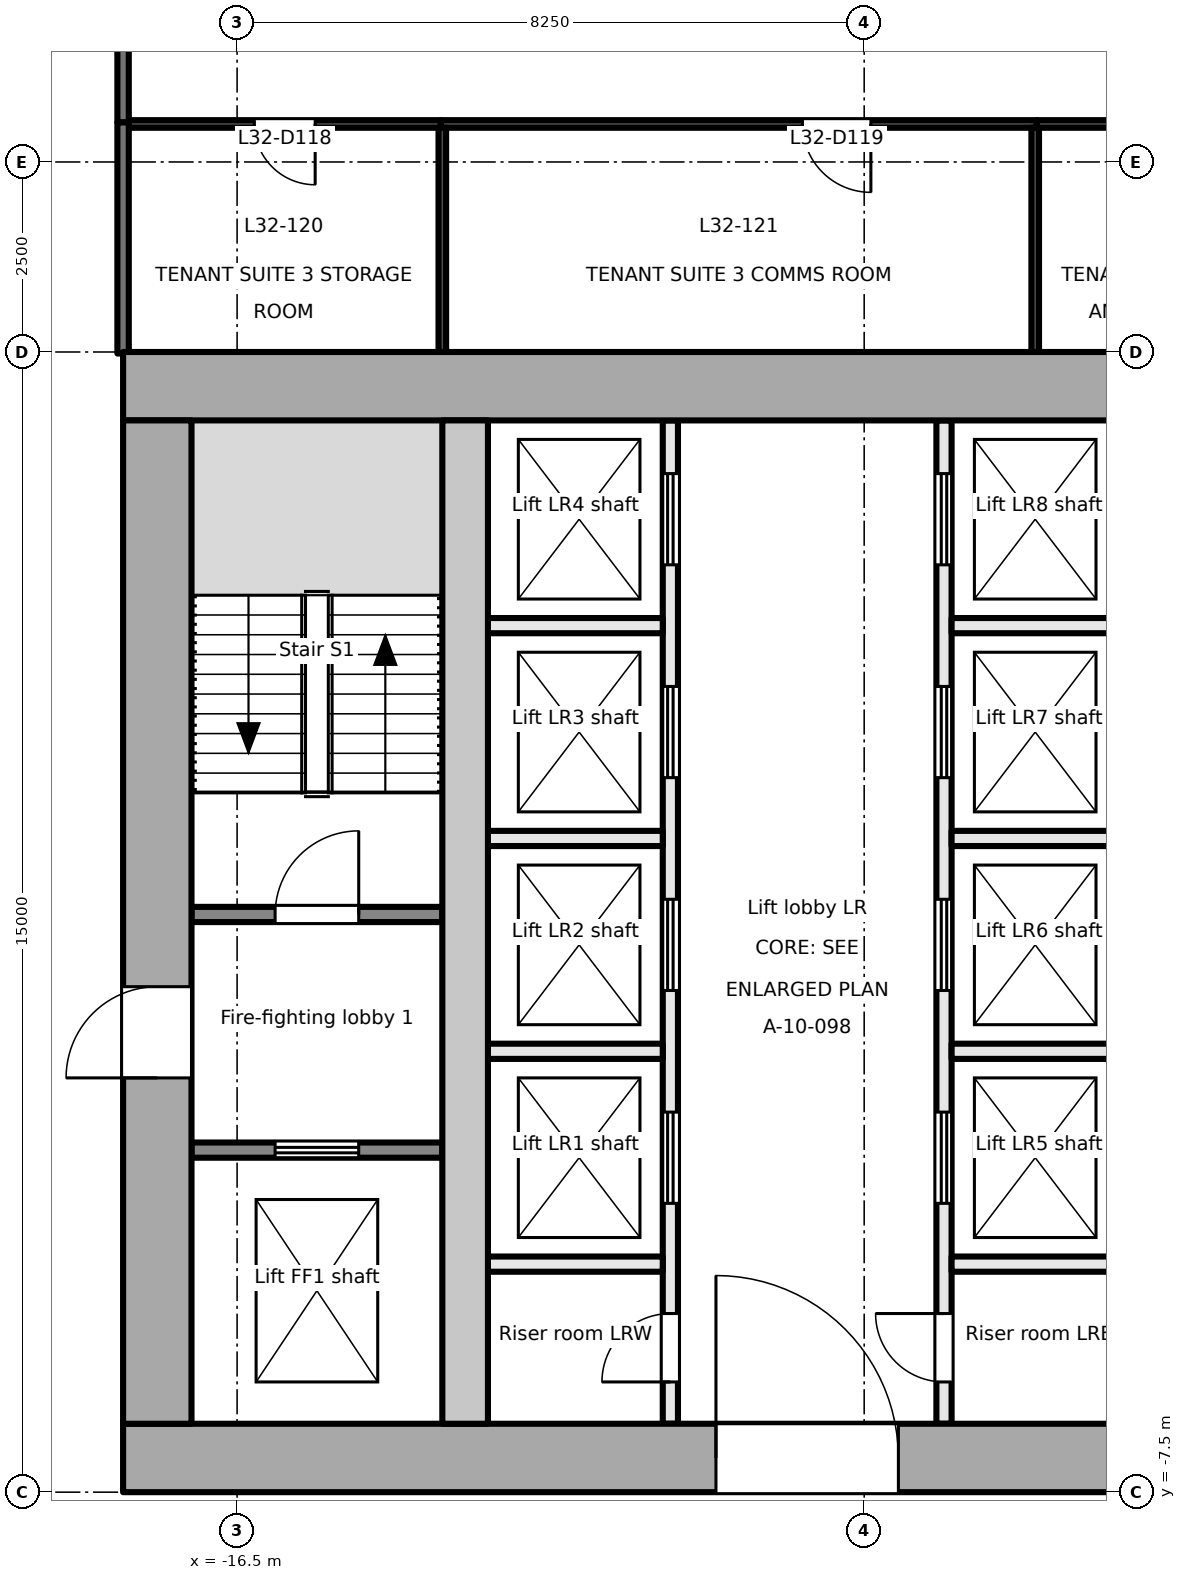
"""IFC4 building model, lengths in metres.
Left out: names, types, materials, properties, quantities, classifications, styles, units other than length and angle.
Written with IfcOpenShell. Run it as: python <this file> out.ifc"""

import sys

from ifc_helpers import new_model, si_unit, direction, frame, frame_2d, origin, place, context, subcontext, project, spatial, rectangle, extrude, element, fill, save


model = new_model("IFC4")
c1 = context("Model", 3, precision=1e-05, world=origin(), true_north=direction((0.0, 1.0)))
c2 = subcontext(c1, "Body", "Model", "MODEL_VIEW")
j1 = project(units=[si_unit("LENGTHUNIT", "METRE"), si_unit("PLANEANGLEUNIT", "RADIAN")], contexts=[c1])
p1 = place(None, origin())
s1 = spatial("IfcSite", under=j1, at=p1, CompositionType="ELEMENT")
p2 = place(p1, origin())
s2 = spatial("IfcBuilding", under=s1, at=p2, CompositionType="ELEMENT")
p3 = place(p2, frame((0.0, 0.0, 142.1)))
s3 = spatial("IfcBuildingStorey", under=s2, at=p3, CompositionType="ELEMENT", Elevation=142.1)
p4 = place(p3, frame((-18.0, -7.05, -0.2), z_axis=(0.0, 0.0, 1.0), x_axis=(1.0, 0.0, 0.0)))
e1 = element("IfcWall", 1, at=p4, inside=s3, PredefinedType="SHEAR", context=c2, shape_type="SweptSolid", body=[
    extrude(rectangle(XDim=36.0, YDim=0.9, at=frame_2d((18.0, 0.0))), origin(), (0.0, 0.0, 1.0), 4.0),
])
p5 = place(p4, frame((7.8, 0.0, 0.2)))
e2 = element("IfcOpeningElement", 2, at=p5, cuts=e1, PredefinedType="OPENING", context=c2, shape_type="SweptSolid", body=[
    extrude(rectangle(XDim=2.4, YDim=2.1, at=frame_2d((1.2, 1.05))), frame((0.0, 0.46, 0.0), z_axis=(0.0, -1.0, 0.0), x_axis=(1.0, 0.0, 0.0)), (0.0, 0.0, 1.0), 0.921),
])
p6 = place(p4, frame((17.4, 0.0, 0.2)))
e3 = element("IfcOpeningElement", 3, at=p6, cuts=e1, PredefinedType="OPENING", context=c2, shape_type="SweptSolid", body=[
    extrude(rectangle(XDim=1.2, YDim=2.1, at=frame_2d((0.6, 1.05))), frame((0.0, 0.46, 0.0), z_axis=(0.0, -1.0, 0.0), x_axis=(1.0, 0.0, 0.0)), (0.0, 0.0, 1.0), 0.921),
])
p7 = place(p4, frame((26.1, 0.0, 0.2)))
e4 = element("IfcOpeningElement", 4, at=p7, cuts=e1, PredefinedType="OPENING", context=c2, shape_type="SweptSolid", body=[
    extrude(rectangle(XDim=2.4, YDim=2.1, at=frame_2d((1.2, 1.05))), frame((0.0, 0.46, 0.0), z_axis=(0.0, -1.0, 0.0), x_axis=(1.0, 0.0, 0.0)), (0.0, 0.0, 1.0), 0.921),
])
p8 = place(p3, frame((-18.0, 7.05, -0.2), z_axis=(0.0, 0.0, 1.0), x_axis=(1.0, 0.0, 0.0)))
e5 = element("IfcWall", 5, at=p8, inside=s3, PredefinedType="SHEAR", context=c2, shape_type="SweptSolid", body=[
    extrude(rectangle(XDim=36.0, YDim=0.9, at=frame_2d((18.0, 0.0))), origin(), (0.0, 0.0, 1.0), 4.0),
])
p9 = place(p3, frame((-17.55, -6.6, -0.2), z_axis=(0.0, 0.0, 1.0), x_axis=(0.0, 1.0, 0.0)))
e6 = element("IfcWall", 6, at=p9, inside=s3, PredefinedType="SHEAR", context=c2, shape_type="SweptSolid", body=[
    extrude(rectangle(XDim=13.2, YDim=0.9, at=frame_2d((6.6, 0.0))), origin(), (0.0, 0.0, 1.0), 4.0),
])
p10 = place(p9, frame((4.55, 0.0, 0.2)))
e7 = element("IfcOpeningElement", 7, at=p10, cuts=e6, PredefinedType="OPENING", context=c2, shape_type="SweptSolid", body=[
    extrude(rectangle(XDim=1.2, YDim=2.1, at=frame_2d((0.6, 1.05))), frame((0.0, 0.46, 0.0), z_axis=(0.0, -1.0, 0.0), x_axis=(1.0, 0.0, 0.0)), (0.0, 0.0, 1.0), 0.921),
])
p11 = place(p3, frame((-13.5, -6.6, -0.2), z_axis=(0.0, 0.0, 1.0), x_axis=(0.0, 1.0, 0.0)))
e8 = element("IfcWall", 8, at=p11, inside=s3, PredefinedType="SHEAR", context=c2, shape_type="SweptSolid", body=[
    extrude(rectangle(XDim=13.2, YDim=0.6, at=frame_2d((6.6, 0.0))), origin(), (0.0, 0.0, 1.0), 4.0),
])
p12 = place(p3, frame((-17.1, -3.0, 0.0), z_axis=(0.0, 0.0, 1.0), x_axis=(1.0, 0.0, 0.0)))
e9 = element("IfcWall", 9, at=p12, inside=s3, PredefinedType="PARTITIONING", context=c2, shape_type="SweptSolid", body=[
    extrude(rectangle(XDim=3.3, YDim=0.2, at=frame_2d((1.65, 0.0))), origin(), (0.0, 0.0, 1.0), 3.8),
])
p13 = place(p12, frame((1.1, 0.0, 0.0)))
e10 = element("IfcOpeningElement", 10, at=p13, cuts=e9, PredefinedType="OPENING", context=c2, shape_type="SweptSolid", body=[
    extrude(rectangle(XDim=1.1, YDim=2.1, at=frame_2d((0.55, 1.05))), frame((0.0, 0.111, 0.0), z_axis=(0.0, -1.0, 0.0), x_axis=(1.0, 0.0, 0.0)), (0.0, 0.0, 1.0), 0.221),
])
p14 = place(p3, frame((-17.1, 0.1, 0.0), z_axis=(0.0, 0.0, 1.0), x_axis=(1.0, 0.0, 0.0)))
e11 = element("IfcWall", 11, at=p14, inside=s3, PredefinedType="PARTITIONING", context=c2, shape_type="SweptSolid", body=[
    extrude(rectangle(XDim=3.3, YDim=0.2, at=frame_2d((1.65, 0.0))), origin(), (0.0, 0.0, 1.0), 3.8),
])
p15 = place(p14, frame((1.1, 0.0, 0.0)))
e12 = element("IfcOpeningElement", 12, at=p15, cuts=e11, PredefinedType="OPENING", context=c2, shape_type="SweptSolid", body=[
    extrude(rectangle(XDim=1.1, YDim=2.1, at=frame_2d((0.55, 1.05))), frame((0.0, 0.111, 0.0), z_axis=(0.0, -1.0, 0.0), x_axis=(1.0, 0.0, 0.0)), (0.0, 0.0, 1.0), 0.221),
])
p16 = place(p3, frame((-10.8, -6.6, 0.0), z_axis=(0.0, 0.0, 1.0), x_axis=(0.0, 1.0, 0.0)))
e13 = element("IfcWall", 13, at=p16, inside=s3, PredefinedType="PARTITIONING", context=c2, shape_type="SweptSolid", body=[
    extrude(rectangle(XDim=13.2, YDim=0.2, at=frame_2d((6.6, 0.0))), origin(), (0.0, 0.0, 1.0), 3.8),
])
p17 = place(p16, frame((0.55, 0.0, 0.0)))
e14 = element("IfcOpeningElement", 14, at=p17, cuts=e13, PredefinedType="OPENING", context=c2, shape_type="SweptSolid", body=[
    extrude(rectangle(XDim=0.9, YDim=2.1, at=frame_2d((0.45, 1.05))), frame((0.0, 0.111, 0.0), z_axis=(0.0, -1.0, 0.0), x_axis=(1.0, 0.0, 0.0)), (0.0, 0.0, 1.0), 0.221),
])
p18 = place(p16, frame((2.9, 0.0, 0.0)))
e15 = element("IfcOpeningElement", 15, at=p18, cuts=e13, PredefinedType="OPENING", context=c2, shape_type="SweptSolid", body=[
    extrude(rectangle(XDim=1.2, YDim=2.1, at=frame_2d((0.6, 1.05))), frame((0.0, 0.111, 0.0), z_axis=(0.0, -1.0, 0.0), x_axis=(1.0, 0.0, 0.0)), (0.0, 0.0, 1.0), 0.221),
])
p19 = place(p16, frame((5.7, 0.0, 0.0)))
e16 = element("IfcOpeningElement", 16, at=p19, cuts=e13, PredefinedType="OPENING", context=c2, shape_type="SweptSolid", body=[
    extrude(rectangle(XDim=1.2, YDim=2.1, at=frame_2d((0.6, 1.05))), frame((0.0, 0.111, 0.0), z_axis=(0.0, -1.0, 0.0), x_axis=(1.0, 0.0, 0.0)), (0.0, 0.0, 1.0), 0.221),
])
p20 = place(p16, frame((8.5, 0.0, 0.0)))
e17 = element("IfcOpeningElement", 17, at=p20, cuts=e13, PredefinedType="OPENING", context=c2, shape_type="SweptSolid", body=[
    extrude(rectangle(XDim=1.2, YDim=2.1, at=frame_2d((0.6, 1.05))), frame((0.0, 0.111, 0.0), z_axis=(0.0, -1.0, 0.0), x_axis=(1.0, 0.0, 0.0)), (0.0, 0.0, 1.0), 0.221),
])
p21 = place(p16, frame((11.3, 0.0, 0.0)))
e18 = element("IfcOpeningElement", 18, at=p21, cuts=e13, PredefinedType="OPENING", context=c2, shape_type="SweptSolid", body=[
    extrude(rectangle(XDim=1.2, YDim=2.1, at=frame_2d((0.6, 1.05))), frame((0.0, 0.111, 0.0), z_axis=(0.0, -1.0, 0.0), x_axis=(1.0, 0.0, 0.0)), (0.0, 0.0, 1.0), 0.221),
])
p22 = place(p3, frame((-7.2, -6.6, 0.0), z_axis=(0.0, 0.0, 1.0), x_axis=(0.0, 1.0, 0.0)))
e19 = element("IfcWall", 19, at=p22, inside=s3, PredefinedType="PARTITIONING", context=c2, shape_type="SweptSolid", body=[
    extrude(rectangle(XDim=13.2, YDim=0.2, at=frame_2d((6.6, 0.0))), origin(), (0.0, 0.0, 1.0), 3.8),
])
p23 = place(p22, frame((0.55, 0.0, 0.0)))
e20 = element("IfcOpeningElement", 20, at=p23, cuts=e19, PredefinedType="OPENING", context=c2, shape_type="SweptSolid", body=[
    extrude(rectangle(XDim=0.9, YDim=2.1, at=frame_2d((0.45, 1.05))), frame((0.0, 0.111, 0.0), z_axis=(0.0, -1.0, 0.0), x_axis=(1.0, 0.0, 0.0)), (0.0, 0.0, 1.0), 0.221),
])
p24 = place(p22, frame((2.9, 0.0, 0.0)))
e21 = element("IfcOpeningElement", 21, at=p24, cuts=e19, PredefinedType="OPENING", context=c2, shape_type="SweptSolid", body=[
    extrude(rectangle(XDim=1.2, YDim=2.1, at=frame_2d((0.6, 1.05))), frame((0.0, 0.111, 0.0), z_axis=(0.0, -1.0, 0.0), x_axis=(1.0, 0.0, 0.0)), (0.0, 0.0, 1.0), 0.221),
])
p25 = place(p22, frame((5.7, 0.0, 0.0)))
e22 = element("IfcOpeningElement", 22, at=p25, cuts=e19, PredefinedType="OPENING", context=c2, shape_type="SweptSolid", body=[
    extrude(rectangle(XDim=1.2, YDim=2.1, at=frame_2d((0.6, 1.05))), frame((0.0, 0.111, 0.0), z_axis=(0.0, -1.0, 0.0), x_axis=(1.0, 0.0, 0.0)), (0.0, 0.0, 1.0), 0.221),
])
p26 = place(p22, frame((8.5, 0.0, 0.0)))
e23 = element("IfcOpeningElement", 23, at=p26, cuts=e19, PredefinedType="OPENING", context=c2, shape_type="SweptSolid", body=[
    extrude(rectangle(XDim=1.2, YDim=2.1, at=frame_2d((0.6, 1.05))), frame((0.0, 0.111, 0.0), z_axis=(0.0, -1.0, 0.0), x_axis=(1.0, 0.0, 0.0)), (0.0, 0.0, 1.0), 0.221),
])
p27 = place(p22, frame((11.3, 0.0, 0.0)))
e24 = element("IfcOpeningElement", 24, at=p27, cuts=e19, PredefinedType="OPENING", context=c2, shape_type="SweptSolid", body=[
    extrude(rectangle(XDim=1.2, YDim=2.1, at=frame_2d((0.6, 1.05))), frame((0.0, 0.111, 0.0), z_axis=(0.0, -1.0, 0.0), x_axis=(1.0, 0.0, 0.0)), (0.0, 0.0, 1.0), 0.221),
])
for number, where, z_axis, x_axis in (
    (25, (-13.2, -1.7, 0.0), (0.0, 0.0, 1.0), (1.0, 0.0, 0.0)),
    (26, (-13.2, 1.1, 0.0), (0.0, 0.0, 1.0), (1.0, 0.0, 0.0)),
    (27, (-13.2, 3.9, 0.0), (0.0, 0.0, 1.0), (1.0, 0.0, 0.0)),
    (28, (-13.2, -4.5, 0.0), (0.0, 0.0, 1.0), (1.0, 0.0, 0.0)),
    (29, (-7.1, -1.7, 0.0), (0.0, 0.0, 1.0), (1.0, 0.0, 0.0)),
    (30, (-7.1, 1.1, 0.0), (0.0, 0.0, 1.0), (1.0, 0.0, 0.0)),
    (31, (-7.1, 3.9, 0.0), (0.0, 0.0, 1.0), (1.0, 0.0, 0.0)),
    (32, (-7.1, -4.5, 0.0), (0.0, 0.0, 1.0), (1.0, 0.0, 0.0)),
):
    element("IfcWall", number, at=place(p3, frame(where, z_axis=z_axis, x_axis=x_axis)), inside=s3, PredefinedType="PARTITIONING", context=c2, shape_type="SweptSolid", body=[
        extrude(rectangle(XDim=2.3, YDim=0.2, at=frame_2d((1.15, 0.0))), origin(), (0.0, 0.0, 1.0), 3.8),
    ])
p28 = place(p3, frame((-18.0, 12.24, 0.0), z_axis=(0.0, 0.0, 1.0), x_axis=(0.0, -1.0, 0.0)))
e33 = element("IfcWall", 33, at=p28, inside=s3, PredefinedType="PARTITIONING", context=c2, shape_type="SweptSolid", body=[
    extrude(rectangle(XDim=1.72, YDim=0.15, at=frame_2d((0.86, 0.0))), origin(), (0.0, 0.0, 1.0), 3.8),
])
p29 = place(p3, frame((-18.0, 10.52, 0.0), z_axis=(0.0, 0.0, 1.0), x_axis=(0.0, -1.0, 0.0)))
e34 = element("IfcWall", 34, at=p29, inside=s3, PredefinedType="PARTITIONING", context=c2, shape_type="SweptSolid", body=[
    extrude(rectangle(XDim=3.04, YDim=0.15, at=frame_2d((1.52, 0.0))), origin(), (0.0, 0.0, 1.0), 3.8),
])
p30 = place(p3, frame((-13.82, 10.5, 0.0), z_axis=(0.0, 0.0, 1.0), x_axis=(-1.0, 0.0, 0.0)))
e35 = element("IfcWall", 35, at=p30, inside=s3, PredefinedType="PARTITIONING", context=c2, shape_type="SweptSolid", body=[
    extrude(rectangle(XDim=4.105, YDim=0.1, at=frame_2d((2.052, 0.0))), origin(), (0.0, 0.0, 1.0), 3.8),
])
p31 = place(p30, frame((1.653, 0.0, 0.0)))
e36 = element("IfcOpeningElement", 36, at=p31, cuts=e35, PredefinedType="OPENING", context=c2, shape_type="SweptSolid", body=[
    extrude(rectangle(XDim=0.8, YDim=2.1, at=frame_2d((0.4, 1.05))), frame((0.0, 0.061, 0.0), z_axis=(0.0, -1.0, 0.0), x_axis=(1.0, 0.0, 0.0)), (0.0, 0.0, 1.0), 0.121),
])
p32 = place(p3, frame((-5.98, 10.5, 0.0), z_axis=(0.0, 0.0, 1.0), x_axis=(-1.0, 0.0, 0.0)))
e37 = element("IfcWall", 37, at=p32, inside=s3, PredefinedType="PARTITIONING", context=c2, shape_type="SweptSolid", body=[
    extrude(rectangle(XDim=7.84, YDim=0.1, at=frame_2d((3.92, 0.0))), origin(), (0.0, 0.0, 1.0), 3.5),
])
p33 = place(p32, frame((2.182, 0.0, 0.0)))
e38 = element("IfcOpeningElement", 38, at=p33, cuts=e37, PredefinedType="OPENING", context=c2, shape_type="SweptSolid", body=[
    extrude(rectangle(XDim=0.9, YDim=2.1, at=frame_2d((0.45, 1.05))), frame((0.0, 0.061, 0.0), z_axis=(0.0, -1.0, 0.0), x_axis=(1.0, 0.0, 0.0)), (0.0, 0.0, 1.0), 0.121),
])
p34 = place(p3, frame((-2.42, 10.5, 0.0), z_axis=(0.0, 0.0, 1.0), x_axis=(-1.0, 0.0, 0.0)))
e39 = element("IfcWall", 39, at=p34, inside=s3, PredefinedType="PARTITIONING", context=c2, shape_type="SweptSolid", body=[
    extrude(rectangle(XDim=3.56, YDim=0.1, at=frame_2d((1.78, 0.0))), origin(), (0.0, 0.0, 1.0), 3.5),
])
p35 = place(p34, frame((1.38, 0.0, 0.0)))
e40 = element("IfcOpeningElement", 40, at=p35, cuts=e39, PredefinedType="OPENING", context=c2, shape_type="SweptSolid", body=[
    extrude(rectangle(XDim=0.8, YDim=2.1, at=frame_2d((0.4, 1.05))), frame((0.0, 0.061, 0.0), z_axis=(0.0, -1.0, 0.0), x_axis=(1.0, 0.0, 0.0)), (0.0, 0.0, 1.0), 0.121),
])
for number, where, z_axis, x_axis in (
    (41, (-13.8, 10.45, 0.0), (0.0, 0.0, 1.0), (0.0, -1.0, 0.0)),
    (42, (-6.0, 10.45, 0.0), (0.0, 0.0, 1.0), (0.0, -1.0, 0.0)),
):
    element("IfcWall", number, at=place(p3, frame(where, z_axis=z_axis, x_axis=x_axis)), inside=s3, PredefinedType="PARTITIONING", context=c2, shape_type="SweptSolid", body=[
        extrude(rectangle(XDim=2.95, YDim=0.1, at=frame_2d((1.475, 0.0))), origin(), (0.0, 0.0, 1.0), 3.8),
    ])
p36 = place(p13, origin())
e43 = element("IfcDoor", 43, at=p36, inside=s3, OperationType="DOUBLE_DOOR_SLIDING", PredefinedType="DOOR", context=c2, shape_type="SweptSolid", body=[
    extrude(rectangle(XDim=1.1, YDim=2.1, at=frame_2d((0.55, 1.05))), frame((0.0, 0.025, 0.0), z_axis=(0.0, -1.0, 0.0), x_axis=(1.0, 0.0, 0.0)), (0.0, 0.0, 1.0), 0.05),
])
fill(e10, e43)
p37 = place(p10, origin())
e44 = element("IfcDoor", 44, at=p37, inside=s3, OperationType="SINGLE_SWING_LEFT", PredefinedType="DOOR", context=c2, shape_type="SweptSolid", body=[
    extrude(rectangle(XDim=1.2, YDim=2.1, at=frame_2d((0.6, 1.05))), frame((0.0, 0.025, 0.0), z_axis=(0.0, -1.0, 0.0), x_axis=(1.0, 0.0, 0.0)), (0.0, 0.0, 1.0), 0.05),
])
fill(e7, e44)
p38 = place(p15, origin())
e45 = element("IfcDoor", 45, at=p38, inside=s3, OperationType="SINGLE_SWING_RIGHT", PredefinedType="DOOR", context=c2, shape_type="SweptSolid", body=[
    extrude(rectangle(XDim=1.1, YDim=2.1, at=frame_2d((0.55, 1.05))), frame((0.0, 0.025, 0.0), z_axis=(0.0, -1.0, 0.0), x_axis=(1.0, 0.0, 0.0)), (0.0, 0.0, 1.0), 0.05),
])
fill(e12, e45)
p39 = place(p17, origin())
e46 = element("IfcDoor", 46, at=p39, inside=s3, OperationType="SINGLE_SWING_LEFT", PredefinedType="DOOR", context=c2, shape_type="SweptSolid", body=[
    extrude(rectangle(XDim=0.9, YDim=2.1, at=frame_2d((0.45, 1.05))), frame((0.0, 0.025, 0.0), z_axis=(0.0, -1.0, 0.0), x_axis=(1.0, 0.0, 0.0)), (0.0, 0.0, 1.0), 0.05),
])
fill(e14, e46)
p40 = place(p18, origin())
e47 = element("IfcDoor", 47, at=p40, inside=s3, OperationType="DOUBLE_DOOR_SLIDING", PredefinedType="DOOR", context=c2, shape_type="SweptSolid", body=[
    extrude(rectangle(XDim=1.2, YDim=2.1, at=frame_2d((0.6, 1.05))), frame((0.0, 0.025, 0.0), z_axis=(0.0, -1.0, 0.0), x_axis=(1.0, 0.0, 0.0)), (0.0, 0.0, 1.0), 0.05),
])
fill(e15, e47)
p41 = place(p19, origin())
e48 = element("IfcDoor", 48, at=p41, inside=s3, OperationType="DOUBLE_DOOR_SLIDING", PredefinedType="DOOR", context=c2, shape_type="SweptSolid", body=[
    extrude(rectangle(XDim=1.2, YDim=2.1, at=frame_2d((0.6, 1.05))), frame((0.0, 0.025, 0.0), z_axis=(0.0, -1.0, 0.0), x_axis=(1.0, 0.0, 0.0)), (0.0, 0.0, 1.0), 0.05),
])
fill(e16, e48)
p42 = place(p20, origin())
e49 = element("IfcDoor", 49, at=p42, inside=s3, OperationType="DOUBLE_DOOR_SLIDING", PredefinedType="DOOR", context=c2, shape_type="SweptSolid", body=[
    extrude(rectangle(XDim=1.2, YDim=2.1, at=frame_2d((0.6, 1.05))), frame((0.0, 0.025, 0.0), z_axis=(0.0, -1.0, 0.0), x_axis=(1.0, 0.0, 0.0)), (0.0, 0.0, 1.0), 0.05),
])
fill(e17, e49)
p43 = place(p21, origin())
e50 = element("IfcDoor", 50, at=p43, inside=s3, OperationType="DOUBLE_DOOR_SLIDING", PredefinedType="DOOR", context=c2, shape_type="SweptSolid", body=[
    extrude(rectangle(XDim=1.2, YDim=2.1, at=frame_2d((0.6, 1.05))), frame((0.0, 0.025, 0.0), z_axis=(0.0, -1.0, 0.0), x_axis=(1.0, 0.0, 0.0)), (0.0, 0.0, 1.0), 0.05),
])
fill(e18, e50)
p44 = place(p23, origin())
e51 = element("IfcDoor", 51, at=p44, inside=s3, OperationType="SINGLE_SWING_RIGHT", PredefinedType="DOOR", context=c2, shape_type="SweptSolid", body=[
    extrude(rectangle(XDim=0.9, YDim=2.1, at=frame_2d((0.45, 1.05))), frame((0.0, 0.025, 0.0), z_axis=(0.0, -1.0, 0.0), x_axis=(1.0, 0.0, 0.0)), (0.0, 0.0, 1.0), 0.05),
])
fill(e20, e51)
p45 = place(p24, origin())
e52 = element("IfcDoor", 52, at=p45, inside=s3, OperationType="DOUBLE_DOOR_SLIDING", PredefinedType="DOOR", context=c2, shape_type="SweptSolid", body=[
    extrude(rectangle(XDim=1.2, YDim=2.1, at=frame_2d((0.6, 1.05))), frame((0.0, 0.025, 0.0), z_axis=(0.0, -1.0, 0.0), x_axis=(1.0, 0.0, 0.0)), (0.0, 0.0, 1.0), 0.05),
])
fill(e21, e52)
p46 = place(p25, origin())
e53 = element("IfcDoor", 53, at=p46, inside=s3, OperationType="DOUBLE_DOOR_SLIDING", PredefinedType="DOOR", context=c2, shape_type="SweptSolid", body=[
    extrude(rectangle(XDim=1.2, YDim=2.1, at=frame_2d((0.6, 1.05))), frame((0.0, 0.025, 0.0), z_axis=(0.0, -1.0, 0.0), x_axis=(1.0, 0.0, 0.0)), (0.0, 0.0, 1.0), 0.05),
])
fill(e22, e53)
p47 = place(p26, origin())
e54 = element("IfcDoor", 54, at=p47, inside=s3, OperationType="DOUBLE_DOOR_SLIDING", PredefinedType="DOOR", context=c2, shape_type="SweptSolid", body=[
    extrude(rectangle(XDim=1.2, YDim=2.1, at=frame_2d((0.6, 1.05))), frame((0.0, 0.025, 0.0), z_axis=(0.0, -1.0, 0.0), x_axis=(1.0, 0.0, 0.0)), (0.0, 0.0, 1.0), 0.05),
])
fill(e23, e54)
p48 = place(p27, origin())
e55 = element("IfcDoor", 55, at=p48, inside=s3, OperationType="DOUBLE_DOOR_SLIDING", PredefinedType="DOOR", context=c2, shape_type="SweptSolid", body=[
    extrude(rectangle(XDim=1.2, YDim=2.1, at=frame_2d((0.6, 1.05))), frame((0.0, 0.025, 0.0), z_axis=(0.0, -1.0, 0.0), x_axis=(1.0, 0.0, 0.0)), (0.0, 0.0, 1.0), 0.05),
])
fill(e24, e55)
p49 = place(p5, origin())
e56 = element("IfcDoor", 56, at=p49, inside=s3, OperationType="DOUBLE_DOOR_DOUBLE_SWING", PredefinedType="DOOR", context=c2, shape_type="SweptSolid", body=[
    extrude(rectangle(XDim=2.4, YDim=2.1, at=frame_2d((1.2, 1.05))), frame((0.0, 0.025, 0.0), z_axis=(0.0, -1.0, 0.0), x_axis=(1.0, 0.0, 0.0)), (0.0, 0.0, 1.0), 0.05),
])
fill(e2, e56)
p50 = place(p31, origin())
e57 = element("IfcDoor", 57, at=p50, inside=s3, OperationType="SINGLE_SWING_LEFT", PredefinedType="DOOR", context=c2, shape_type="SweptSolid", body=[
    extrude(rectangle(XDim=0.8, YDim=2.1, at=frame_2d((0.4, 1.05))), frame((0.0, 0.025, 0.0), z_axis=(0.0, -1.0, 0.0), x_axis=(1.0, 0.0, 0.0)), (0.0, 0.0, 1.0), 0.05),
])
fill(e36, e57)
p51 = place(p33, origin())
e58 = element("IfcDoor", 58, at=p51, inside=s3, OperationType="SINGLE_SWING_LEFT", PredefinedType="DOOR", context=c2, shape_type="SweptSolid", body=[
    extrude(rectangle(XDim=0.9, YDim=2.1, at=frame_2d((0.45, 1.05))), frame((0.0, 0.025, 0.0), z_axis=(0.0, -1.0, 0.0), x_axis=(1.0, 0.0, 0.0)), (0.0, 0.0, 1.0), 0.05),
])
fill(e38, e58)
save(model, sys.argv[1])
